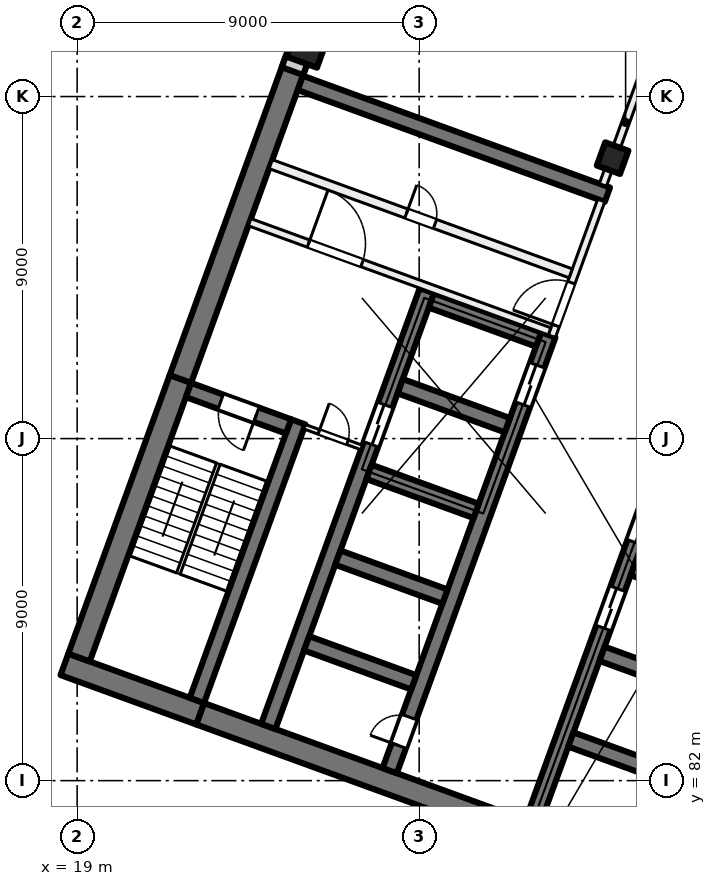
"""IFC4 building model, lengths in metres.
Left out: names, types, materials, properties, quantities, classifications, styles, units other than length and angle.
Written with IfcOpenShell. Run it as: python <this file> out.ifc"""

import sys

from ifc_helpers import new_model, si_unit, direction, frame, frame_2d, origin, origin_2d, place, context, subcontext, project, spatial, rectangle, extrude, element, fill, save


model = new_model("IFC4")
c1 = context("Model", 3, precision=1e-05, world=origin(), true_north=direction((0.0, 1.0)))
c2 = subcontext(c1, "Body", "Model", "MODEL_VIEW")
j1 = project(units=[si_unit("LENGTHUNIT", "METRE"), si_unit("PLANEANGLEUNIT", "RADIAN")], contexts=[c1])
p1 = place(None, origin())
s1 = spatial("IfcSite", under=j1, at=p1, CompositionType="ELEMENT")
p2 = place(p1, origin())
s2 = spatial("IfcBuilding", under=s1, at=p2, CompositionType="ELEMENT")
p3 = place(p2, frame((0.0, 0.0, 109.0)))
s3 = spatial("IfcBuildingStorey", under=s2, at=p3, CompositionType="ELEMENT", Elevation=109.0)
p4 = place(p3, frame((33.091, 98.379, 0.0), z_axis=(0.0, 0.0, 1.0), x_axis=(-0.342020143326, -0.939692620786, 0.0)))
e1 = element("IfcColumn", 1, at=p4, inside=s3, PredefinedType="COLUMN", context=c2, shape_type="SweptSolid", body=[
    extrude(rectangle(XDim=0.65, YDim=0.65, at=origin_2d()), origin(), (0.0, 0.0, 1.0), 4.0),
])
p5 = place(p3, frame((25.056, 101.303, 0.0), z_axis=(0.0, 0.0, 1.0), x_axis=(-0.342020143326, -0.939692620786, 0.0)))
e2 = element("IfcColumn", 2, at=p5, inside=s3, PredefinedType="COLUMN", context=c2, shape_type="SweptSolid", body=[
    extrude(rectangle(XDim=0.85, YDim=0.85, at=origin_2d()), origin(), (0.0, 0.0, 1.0), 4.0),
])
p6 = place(p3, frame((35.767, 78.835, 0.0), z_axis=(0.0, 0.0, 1.0), x_axis=(-0.939692894512, 0.342019391267, 0.0)))
e3 = element("IfcWall", 3, at=p6, inside=s3, PredefinedType="SHEAR", context=c2, shape_type="SweptSolid", body=[
    extrude(rectangle(XDim=14.4, YDim=0.6, at=frame_2d((7.2, 0.0))), origin(), (0.0, 0.0, 1.0), 4.0),
])
p7 = place(p3, frame((22.236, 83.76, 0.0), z_axis=(0.0, 0.0, 1.0), x_axis=(-0.939680822529, 0.342052557032, 0.0)))
e4 = element("IfcWall", 4, at=p7, inside=s3, PredefinedType="SHEAR", context=c2, shape_type="SweptSolid", body=[
    extrude(rectangle(XDim=3.8, YDim=0.6, at=frame_2d((1.9, 0.0))), origin(), (0.0, 0.0, 1.0), 4.0),
])
p8 = place(p3, frame((19.05, 85.239, 0.0), z_axis=(0.0, 0.0, 1.0), x_axis=(0.342016982193, 0.939693771338, 0.0)))
e5 = element("IfcWall", 5, at=p8, inside=s3, PredefinedType="SHEAR", context=c2, shape_type="SweptSolid", body=[
    extrude(rectangle(XDim=7.8, YDim=0.6, at=frame_2d((3.9, 0.0))), origin(), (0.0, 0.0, 1.0), 4.0),
])
p9 = place(p3, frame((21.717, 92.568, 0.0), z_axis=(0.0, 0.0, 1.0), x_axis=(0.342017595281, 0.939693548195, 0.0)))
e6 = element("IfcWall", 6, at=p9, inside=s3, PredefinedType="SHEAR", context=c2, shape_type="SweptSolid", body=[
    extrude(rectangle(XDim=8.925, YDim=0.6, at=frame_2d((4.462, 0.0))), origin(), (0.0, 0.0, 1.0), 4.0),
])
p10 = place(p3, frame((22.15, 84.11, 0.0), z_axis=(0.0, 0.0, 1.0), x_axis=(0.342016982193, 0.939693771338, 0.0)))
e7 = element("IfcWall", 7, at=p10, inside=s3, PredefinedType="SHEAR", context=c2, shape_type="SweptSolid", body=[
    extrude(rectangle(XDim=7.8, YDim=0.4, at=frame_2d((3.9, 0.0))), origin(), (0.0, 0.0, 1.0), 4.0),
])
p11 = place(p3, frame((24.562, 91.32, 0.0), z_axis=(0.0, 0.0, 1.0), x_axis=(-0.939717030584, 0.341953070509, 0.0)))
e8 = element("IfcWall", 8, at=p11, inside=s3, PredefinedType="SHEAR", context=c2, shape_type="SweptSolid", body=[
    extrude(rectangle(XDim=2.8, YDim=0.4, at=frame_2d((1.4, 0.0))), origin(), (0.0, 0.0, 1.0), 4.0),
])
p12 = place(p11, frame((0.9, 0.0, 0.0)))
e9 = element("IfcOpeningElement", 9, at=p12, cuts=e8, PredefinedType="OPENING", context=c2, shape_type="SweptSolid", body=[
    extrude(rectangle(XDim=1.0, YDim=2.1, at=frame_2d((0.5, 1.05))), frame((0.0, 0.21, 0.0), z_axis=(0.0, -1.0, 0.0), x_axis=(1.0, 0.0, 0.0)), (0.0, 0.0, 1.0), 0.42),
])
p13 = place(p3, frame((30.984, 80.895, 0.0), z_axis=(0.0, 0.0, 1.0), x_axis=(0.342021021735, 0.939692301071, 0.0)))
e10 = element("IfcWall", 10, at=p13, inside=s3, PredefinedType="SHEAR", context=c2, shape_type="SweptSolid", body=[
    extrude(rectangle(XDim=12.2, YDim=0.4, at=frame_2d((6.1, 0.0))), origin(), (0.0, 0.0, 1.0), 4.0),
])
p14 = place(p13, frame((5.45, 0.0, 0.0)))
e11 = element("IfcOpeningElement", 11, at=p14, cuts=e10, PredefinedType="OPENING", context=c2, shape_type="SweptSolid", body=[
    extrude(rectangle(XDim=1.1, YDim=2.1, at=frame_2d((0.55, 1.05))), frame((0.0, 0.21, 0.0), z_axis=(0.0, -1.0, 0.0), x_axis=(1.0, 0.0, 0.0)), (0.0, 0.0, 1.0), 0.42),
])
p15 = place(p13, frame((7.85, 0.0, 0.0)))
e12 = element("IfcOpeningElement", 12, at=p15, cuts=e10, PredefinedType="OPENING", context=c2, shape_type="SweptSolid", body=[
    extrude(rectangle(XDim=1.1, YDim=2.1, at=frame_2d((0.55, 1.05))), frame((0.0, 0.21, 0.0), z_axis=(0.0, -1.0, 0.0), x_axis=(1.0, 0.0, 0.0)), (0.0, 0.0, 1.0), 0.42),
])
p16 = place(p13, frame((10.25, 0.0, 0.0)))
e13 = element("IfcOpeningElement", 13, at=p16, cuts=e10, PredefinedType="OPENING", context=c2, shape_type="SweptSolid", body=[
    extrude(rectangle(XDim=1.1, YDim=2.1, at=frame_2d((0.55, 1.05))), frame((0.0, 0.21, 0.0), z_axis=(0.0, -1.0, 0.0), x_axis=(1.0, 0.0, 0.0)), (0.0, 0.0, 1.0), 0.42),
])
for number, where, z_axis, x_axis in (
    (14, (34.812, 82.056, 0.0), (0.0, 0.0, 1.0), (-0.94, 0.342, 0.0)),
    (15, (35.632, 84.311, 0.0), (0.0, 0.0, 1.0), (-0.94, 0.342, 0.0)),
    (16, (36.453, 86.566, 0.0), (0.0, 0.0, 1.0), (-0.94, 0.342, 0.0)),
):
    element("IfcWall", number, at=place(p3, frame(where, z_axis=z_axis, x_axis=x_axis)), inside=s3, PredefinedType="SHEAR", context=c2, shape_type="SweptSolid", body=[
        extrude(rectangle(XDim=3.0, YDim=0.4, at=frame_2d((1.5, 0.0))), origin(), (0.0, 0.0, 1.0), 4.0),
    ])
p17 = place(p3, frame((27.225, 82.263, 0.0), z_axis=(0.0, 0.0, 1.0), x_axis=(0.342014590177, 0.939694641948, 0.0)))
e17 = element("IfcWall", 17, at=p17, inside=s3, PredefinedType="SHEAR", context=c2, shape_type="SweptSolid", body=[
    extrude(rectangle(XDim=12.2, YDim=0.4, at=frame_2d((6.1, 0.0))), origin(), (0.0, 0.0, 1.0), 4.0),
])
p18 = place(p17, frame((10.25, 0.0, 0.0)))
e18 = element("IfcOpeningElement", 18, at=p18, cuts=e17, PredefinedType="OPENING", context=c2, shape_type="SweptSolid", body=[
    extrude(rectangle(XDim=1.1, YDim=2.1, at=frame_2d((0.55, 1.05))), frame((0.0, 0.21, 0.0), z_axis=(0.0, -1.0, 0.0), x_axis=(1.0, 0.0, 0.0)), (0.0, 0.0, 1.0), 0.42),
])
p19 = place(p17, frame((0.7, 0.0, 0.0)))
e19 = element("IfcOpeningElement", 19, at=p19, cuts=e17, PredefinedType="OPENING", context=c2, shape_type="SweptSolid", body=[
    extrude(rectangle(XDim=0.8, YDim=2.1, at=frame_2d((0.4, 1.05))), frame((0.0, 0.21, 0.0), z_axis=(0.0, -1.0, 0.0), x_axis=(1.0, 0.0, 0.0)), (0.0, 0.0, 1.0), 0.42),
])
p20 = place(p3, frame((24.03, 83.426, 0.0), z_axis=(0.0, 0.0, 1.0), x_axis=(0.342014590177, 0.939694641948, 0.0)))
e20 = element("IfcWall", 20, at=p20, inside=s3, PredefinedType="SHEAR", context=c2, shape_type="SweptSolid", body=[
    extrude(rectangle(XDim=12.2, YDim=0.4, at=frame_2d((6.1, 0.0))), origin(), (0.0, 0.0, 1.0), 4.0),
])
p21 = place(p20, frame((7.9, 0.0, 0.0)))
e21 = element("IfcOpeningElement", 21, at=p21, cuts=e20, PredefinedType="OPENING", context=c2, shape_type="SweptSolid", body=[
    extrude(rectangle(XDim=1.1, YDim=2.1, at=frame_2d((0.55, 1.05))), frame((0.0, 0.21, 0.0), z_axis=(0.0, -1.0, 0.0), x_axis=(1.0, 0.0, 0.0)), (0.0, 0.0, 1.0), 0.42),
])
p22 = place(p3, frame((27.858, 84.587, 0.0), z_axis=(0.0, 0.0, 1.0), x_axis=(-0.939686455819, 0.342037080957, 0.0)))
e22 = element("IfcWall", 22, at=p22, inside=s3, PredefinedType="SHEAR", context=c2, shape_type="SweptSolid", body=[
    extrude(rectangle(XDim=3.0, YDim=0.4, at=frame_2d((1.5, 0.0))), origin(), (0.0, 0.0, 1.0), 4.0),
])
p23 = place(p3, frame((28.678, 86.842, 0.0), z_axis=(0.0, 0.0, 1.0), x_axis=(-0.939676934218, 0.342063238742, 0.0)))
e23 = element("IfcWall", 23, at=p23, inside=s3, PredefinedType="SHEAR", context=c2, shape_type="SweptSolid", body=[
    extrude(rectangle(XDim=3.0, YDim=0.4, at=frame_2d((1.5, 0.0))), origin(), (0.0, 0.0, 1.0), 4.0),
])
for number, where, z_axis, x_axis in (
    (24, (29.5, 89.097, 0.0), (0.0, 0.0, 1.0), (-0.94, 0.342, 0.0)),
    (25, (30.32, 91.353, 0.0), (0.0, 0.0, 1.0), (-0.94, 0.342, 0.0)),
    (26, (31.141, 93.608, 0.0), (0.0, 0.0, 1.0), (-0.94, 0.342, 0.0)),
):
    element("IfcWall", number, at=place(p3, frame(where, z_axis=z_axis, x_axis=x_axis)), inside=s3, PredefinedType="SHEAR", context=c2, shape_type="SweptSolid", body=[
        extrude(rectangle(XDim=3.0, YDim=0.4, at=frame_2d((1.5, 0.0))), origin(), (0.0, 0.0, 1.0), 4.0),
    ])
p24 = place(p3, frame((32.953, 97.418, 0.0), z_axis=(0.0, 0.0, 1.0), x_axis=(-0.93969060187, 0.342025690201, 0.0)))
e27 = element("IfcWall", 27, at=p24, inside=s3, PredefinedType="SHEAR", context=c2, shape_type="SweptSolid", body=[
    extrude(rectangle(XDim=8.6, YDim=0.4, at=frame_2d((4.3, 0.0))), origin(), (0.0, 0.0, 1.0), 4.0),
])
p25 = place(p3, frame((24.666, 100.669, 0.0), z_axis=(0.0, 0.0, 1.0), x_axis=(0.34201964167, 0.939692803373, 0.0)))
e28 = element("IfcWall", 28, at=p25, inside=s3, PredefinedType="SOLIDWALL", context=c2, shape_type="SweptSolid", body=[
    extrude(rectangle(XDim=32.884, YDim=0.6, at=frame_2d((16.442, 0.0))), origin(), (0.0, 0.0, 1.0), 3.625),
])
p26 = place(p25, frame((1.48, 0.0, 0.9)))
e29 = element("IfcOpeningElement", 29, at=p26, cuts=e28, PredefinedType="OPENING", context=c2, shape_type="SweptSolid", body=[
    extrude(rectangle(XDim=3.0, YDim=2.4, at=frame_2d((1.5, 1.2))), frame((0.0, 0.31, 0.0), z_axis=(0.0, -1.0, 0.0), x_axis=(1.0, 0.0, 0.0)), (0.0, 0.0, 1.0), 0.62),
])
p27 = place(p25, frame((5.98, 0.0, 0.9)))
e30 = element("IfcOpeningElement", 30, at=p27, cuts=e28, PredefinedType="OPENING", context=c2, shape_type="SweptSolid", body=[
    extrude(rectangle(XDim=3.0, YDim=2.4, at=frame_2d((1.5, 1.2))), frame((0.0, 0.31, 0.0), z_axis=(0.0, -1.0, 0.0), x_axis=(1.0, 0.0, 0.0)), (0.0, 0.0, 1.0), 0.62),
])
p28 = place(p25, frame((10.48, 0.0, 0.9)))
e31 = element("IfcOpeningElement", 31, at=p28, cuts=e28, PredefinedType="OPENING", context=c2, shape_type="SweptSolid", body=[
    extrude(rectangle(XDim=3.0, YDim=2.4, at=frame_2d((1.5, 1.2))), frame((0.0, 0.31, 0.0), z_axis=(0.0, -1.0, 0.0), x_axis=(1.0, 0.0, 0.0)), (0.0, 0.0, 1.0), 0.62),
])
p29 = place(p25, frame((14.98, 0.0, 0.9)))
e32 = element("IfcOpeningElement", 32, at=p29, cuts=e28, PredefinedType="OPENING", context=c2, shape_type="SweptSolid", body=[
    extrude(rectangle(XDim=3.0, YDim=2.4, at=frame_2d((1.5, 1.2))), frame((0.0, 0.31, 0.0), z_axis=(0.0, -1.0, 0.0), x_axis=(1.0, 0.0, 0.0)), (0.0, 0.0, 1.0), 0.62),
])
p30 = place(p25, frame((19.48, 0.0, 0.9)))
e33 = element("IfcOpeningElement", 33, at=p30, cuts=e28, PredefinedType="OPENING", context=c2, shape_type="SweptSolid", body=[
    extrude(rectangle(XDim=3.0, YDim=2.4, at=frame_2d((1.5, 1.2))), frame((0.0, 0.31, 0.0), z_axis=(0.0, -1.0, 0.0), x_axis=(1.0, 0.0, 0.0)), (0.0, 0.0, 1.0), 0.62),
])
p31 = place(p25, frame((23.98, 0.0, 0.9)))
e34 = element("IfcOpeningElement", 34, at=p31, cuts=e28, PredefinedType="OPENING", context=c2, shape_type="SweptSolid", body=[
    extrude(rectangle(XDim=3.0, YDim=2.4, at=frame_2d((1.5, 1.2))), frame((0.0, 0.31, 0.0), z_axis=(0.0, -1.0, 0.0), x_axis=(1.0, 0.0, 0.0)), (0.0, 0.0, 1.0), 0.62),
])
p32 = place(p25, frame((28.48, 0.0, 0.9)))
e35 = element("IfcOpeningElement", 35, at=p32, cuts=e28, PredefinedType="OPENING", context=c2, shape_type="SweptSolid", body=[
    extrude(rectangle(XDim=3.0, YDim=2.4, at=frame_2d((1.5, 1.2))), frame((0.0, 0.31, 0.0), z_axis=(0.0, -1.0, 0.0), x_axis=(1.0, 0.0, 0.0)), (0.0, 0.0, 1.0), 0.62),
])
p33 = place(p3, frame((31.491, 93.693, 0.0), z_axis=(0.0, 0.0, 1.0), x_axis=(0.341995824804, 0.939701471648, 0.0)))
e36 = element("IfcWall", 36, at=p33, inside=s3, PredefinedType="PARTITIONING", context=c2, shape_type="SweptSolid", body=[
    extrude(rectangle(XDim=3.8, YDim=0.2, at=frame_2d((1.9, 0.0))), origin(), (0.0, 0.0, 1.0), 3.625),
])
p34 = place(p33, frame((0.3, 0.0, 0.0)))
e37 = element("IfcOpeningElement", 37, at=p34, cuts=e36, PredefinedType="OPENING", context=c2, shape_type="SweptSolid", body=[
    extrude(rectangle(XDim=1.2, YDim=2.1, at=frame_2d((0.6, 1.05))), frame((0.0, 0.11, 0.0), z_axis=(0.0, -1.0, 0.0), x_axis=(1.0, 0.0, 0.0)), (0.0, 0.0, 1.0), 0.22),
])
p35 = place(p3, frame((23.538, 96.694, 0.0), z_axis=(0.0, 0.0, 1.0), x_axis=(0.939691552312, -0.342023078919, 0.0)))
e38 = element("IfcWall", 38, at=p35, inside=s3, PredefinedType="PARTITIONING", context=c2, shape_type="SweptSolid", body=[
    extrude(rectangle(XDim=8.4, YDim=0.2, at=frame_2d((4.2, 0.0))), origin(), (0.0, 0.0, 1.0), 3.625),
])
p36 = place(p35, frame((1.65, 0.0, 0.0)))
e39 = element("IfcOpeningElement", 39, at=p36, cuts=e38, PredefinedType="OPENING", context=c2, shape_type="SweptSolid", body=[
    extrude(rectangle(XDim=1.5, YDim=2.1, at=frame_2d((0.75, 1.05))), frame((0.0, 0.11, 0.0), z_axis=(0.0, -1.0, 0.0), x_axis=(1.0, 0.0, 0.0)), (0.0, 0.0, 1.0), 0.22),
])
p37 = place(p3, frame((24.094, 98.221, 0.0), z_axis=(0.0, 0.0, 1.0), x_axis=(0.939691552312, -0.342023078919, 0.0)))
e40 = element("IfcWall", 40, at=p37, inside=s3, PredefinedType="PARTITIONING", context=c2, shape_type="SweptSolid", body=[
    extrude(rectangle(XDim=8.4, YDim=0.25, at=frame_2d((4.2, 0.0))), origin(), (0.0, 0.0, 1.0), 3.625),
])
p38 = place(p37, frame((3.8, 0.0, 0.0)))
e41 = element("IfcOpeningElement", 41, at=p38, cuts=e40, PredefinedType="OPENING", context=c2, shape_type="SweptSolid", body=[
    extrude(rectangle(XDim=0.8, YDim=2.1, at=frame_2d((0.4, 1.05))), frame((0.0, 0.135, 0.0), z_axis=(0.0, -1.0, 0.0), x_axis=(1.0, 0.0, 0.0)), (0.0, 0.0, 1.0), 0.27),
])
p39 = place(p3, frame((24.985, 91.312, 0.0), z_axis=(0.0, 0.0, 1.0), x_axis=(0.939708740826, -0.341975850632, 0.0)))
e42 = element("IfcWall", 42, at=p39, inside=s3, PredefinedType="PARTITIONING", context=c2, shape_type="SweptSolid", body=[
    extrude(rectangle(XDim=1.6, YDim=0.125, at=frame_2d((0.8, 0.0))), origin(), (0.0, 0.0, 1.0), 3.625),
])
p40 = place(p39, frame((0.4, 0.0, 0.0)))
e43 = element("IfcOpeningElement", 43, at=p40, cuts=e42, PredefinedType="OPENING", context=c2, shape_type="SweptSolid", body=[
    extrude(rectangle(XDim=0.8, YDim=2.1, at=frame_2d((0.4, 1.05))), frame((0.0, 0.073, 0.0), z_axis=(0.0, -1.0, 0.0), x_axis=(1.0, 0.0, 0.0)), (0.0, 0.0, 1.0), 0.145),
])
p41 = place(p3, frame((32.834, 97.674, 0.0), z_axis=(0.0, 0.0, 1.0), x_axis=(0.342017493073, 0.939693585395, 0.0)))
e44 = element("IfcWall", 44, at=p41, inside=s3, PredefinedType="PARTITIONING", context=c2, shape_type="SweptSolid", body=[
    extrude(rectangle(XDim=3.5, YDim=0.2, at=frame_2d((1.75, 0.0))), origin(), (0.0, 0.0, 1.0), 3.625),
])
p42 = place(p18, origin())
e45 = element("IfcDoor", 45, at=p42, inside=s3, OperationType="DOUBLE_DOOR_SLIDING", PredefinedType="DOOR", context=c2, shape_type="SweptSolid", body=[
    extrude(rectangle(XDim=1.1, YDim=2.1, at=frame_2d((0.55, 1.05))), frame((0.0, 0.025, 0.0), z_axis=(0.0, -1.0, 0.0), x_axis=(1.0, 0.0, 0.0)), (0.0, 0.0, 1.0), 0.05),
])
fill(e18, e45)
p43 = place(p14, origin())
e46 = element("IfcDoor", 46, at=p43, inside=s3, OperationType="DOUBLE_DOOR_SLIDING", PredefinedType="DOOR", context=c2, shape_type="SweptSolid", body=[
    extrude(rectangle(XDim=1.1, YDim=2.1, at=frame_2d((0.55, 1.05))), frame((0.0, 0.025, 0.0), z_axis=(0.0, -1.0, 0.0), x_axis=(1.0, 0.0, 0.0)), (0.0, 0.0, 1.0), 0.05),
])
fill(e11, e46)
p44 = place(p15, origin())
e47 = element("IfcDoor", 47, at=p44, inside=s3, OperationType="DOUBLE_DOOR_SLIDING", PredefinedType="DOOR", context=c2, shape_type="SweptSolid", body=[
    extrude(rectangle(XDim=1.1, YDim=2.1, at=frame_2d((0.55, 1.05))), frame((0.0, 0.025, 0.0), z_axis=(0.0, -1.0, 0.0), x_axis=(1.0, 0.0, 0.0)), (0.0, 0.0, 1.0), 0.05),
])
fill(e12, e47)
p45 = place(p19, origin())
e48 = element("IfcDoor", 48, at=p45, inside=s3, OperationType="SINGLE_SWING_LEFT", PredefinedType="DOOR", context=c2, shape_type="SweptSolid", body=[
    extrude(rectangle(XDim=0.8, YDim=2.1, at=frame_2d((0.4, 1.05))), frame((0.0, 0.025, 0.0), z_axis=(0.0, -1.0, 0.0), x_axis=(1.0, 0.0, 0.0)), (0.0, 0.0, 1.0), 0.05),
])
fill(e19, e48)
p46 = place(p34, origin())
e49 = element("IfcDoor", 49, at=p46, inside=s3, OperationType="DOUBLE_DOOR_SINGLE_SWING", PredefinedType="DOOR", context=c2, shape_type="SweptSolid", body=[
    extrude(rectangle(XDim=1.2, YDim=2.1, at=frame_2d((0.6, 1.05))), frame((0.0, 0.025, 0.0), z_axis=(0.0, -1.0, 0.0), x_axis=(1.0, 0.0, 0.0)), (0.0, 0.0, 1.0), 0.05),
])
fill(e37, e49)
p47 = place(p36, origin())
e50 = element("IfcDoor", 50, at=p47, inside=s3, OperationType="DOUBLE_DOOR_SINGLE_SWING", PredefinedType="DOOR", context=c2, shape_type="SweptSolid", body=[
    extrude(rectangle(XDim=1.5, YDim=2.1, at=frame_2d((0.75, 1.05))), frame((0.0, 0.025, 0.0), z_axis=(0.0, -1.0, 0.0), x_axis=(1.0, 0.0, 0.0)), (0.0, 0.0, 1.0), 0.05),
])
fill(e39, e50)
p48 = place(p12, origin())
e51 = element("IfcDoor", 51, at=p48, inside=s3, OperationType="SINGLE_SWING_LEFT", PredefinedType="DOOR", context=c2, shape_type="SweptSolid", body=[
    extrude(rectangle(XDim=1.0, YDim=2.1, at=frame_2d((0.5, 1.05))), frame((0.0, 0.025, 0.0), z_axis=(0.0, -1.0, 0.0), x_axis=(1.0, 0.0, 0.0)), (0.0, 0.0, 1.0), 0.05),
])
fill(e9, e51)
p49 = place(p40, origin())
e52 = element("IfcDoor", 52, at=p49, inside=s3, OperationType="SINGLE_SWING_RIGHT", PredefinedType="DOOR", context=c2, shape_type="SweptSolid", body=[
    extrude(rectangle(XDim=0.8, YDim=2.1, at=frame_2d((0.4, 1.05))), frame((0.0, 0.025, 0.0), z_axis=(0.0, -1.0, 0.0), x_axis=(1.0, 0.0, 0.0)), (0.0, 0.0, 1.0), 0.05),
])
fill(e43, e52)
p50 = place(p38, origin())
e53 = element("IfcDoor", 53, at=p50, inside=s3, OperationType="SINGLE_SWING_LEFT", PredefinedType="DOOR", context=c2, shape_type="SweptSolid", body=[
    extrude(rectangle(XDim=0.8, YDim=2.1, at=frame_2d((0.4, 1.05))), frame((0.0, 0.025, 0.0), z_axis=(0.0, -1.0, 0.0), x_axis=(1.0, 0.0, 0.0)), (0.0, 0.0, 1.0), 0.05),
])
fill(e41, e53)
p51 = place(p21, origin())
e54 = element("IfcDoor", 54, at=p51, inside=s3, OperationType="DOUBLE_DOOR_SLIDING", PredefinedType="DOOR", context=c2, shape_type="SweptSolid", body=[
    extrude(rectangle(XDim=1.1, YDim=2.1, at=frame_2d((0.55, 1.05))), frame((0.0, 0.025, 0.0), z_axis=(0.0, -1.0, 0.0), x_axis=(1.0, 0.0, 0.0)), (0.0, 0.0, 1.0), 0.05),
])
fill(e21, e54)
save(model, sys.argv[1])
